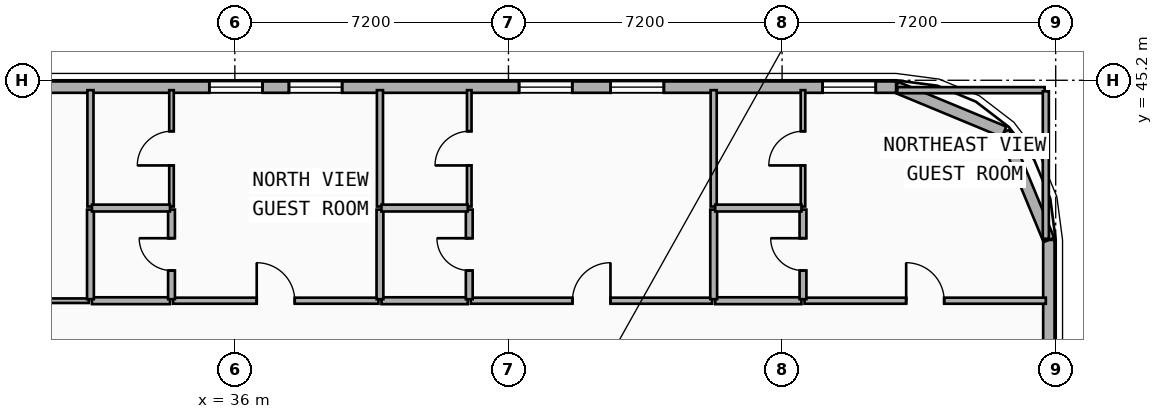
"""IFC4 building model, lengths in metres.
Left out: names, types, materials, properties, quantities, classifications, styles, units other than length and angle.
Written with IfcOpenShell. Run it as: python <this file> out.ifc"""

import sys

from ifc_helpers import new_model, si_unit, direction, frame, frame_2d, origin, place, context, subcontext, project, spatial, rectangle, extrude, element, fill, save


model = new_model("IFC4")
c1 = context("Model", 3, precision=1e-05, world=origin(), true_north=direction((0.0, 1.0)))
c2 = subcontext(c1, "Body", "Model", "MODEL_VIEW")
j1 = project(units=[si_unit("LENGTHUNIT", "METRE"), si_unit("PLANEANGLEUNIT", "RADIAN")], contexts=[c1])
p1 = place(None, origin())
s1 = spatial("IfcSite", under=j1, at=p1, CompositionType="ELEMENT")
p2 = place(p1, origin())
s2 = spatial("IfcBuilding", under=s1, at=p2, CompositionType="ELEMENT")
p3 = place(p2, frame((0.0, 0.0, 29.0)))
s3 = spatial("IfcBuildingStorey", under=s2, at=p3, CompositionType="ELEMENT", Elevation=29.0)
p4 = place(p3, frame((57.42, 41.0, 0.0), z_axis=(0.0, 0.0, 1.0), x_axis=(0.0, -1.0, 0.0)))
e1 = element("IfcWall", 1, at=p4, inside=s3, PredefinedType="SOLIDWALL", context=c2, shape_type="SweptSolid", body=[
    extrude(rectangle(XDim=15.2, YDim=0.3, at=frame_2d((7.6, 0.0))), origin(), (0.0, 0.0, 1.0), 3.24),
])
p5 = place(p4, frame((10.882, 0.0, 0.48)))
e2 = element("IfcOpeningElement", 2, at=p5, cuts=e1, PredefinedType="OPENING", context=c2, shape_type="SweptSolid", body=[
    extrude(rectangle(XDim=1.4, YDim=1.8, at=frame_2d((0.7, 0.9))), frame((0.0, 0.16, 0.0), z_axis=(0.0, -1.0, 0.0), x_axis=(1.0, 0.0, 0.0)), (0.0, 0.0, 1.0), 0.32),
])
p6 = place(p4, frame((5.621, 0.0, 0.48)))
e3 = element("IfcOpeningElement", 3, at=p6, cuts=e1, PredefinedType="OPENING", context=c2, shape_type="SweptSolid", body=[
    extrude(rectangle(XDim=1.4, YDim=1.8, at=frame_2d((0.7, 0.9))), frame((0.0, 0.16, 0.0), z_axis=(0.0, -1.0, 0.0), x_axis=(1.0, 0.0, 0.0)), (0.0, 0.0, 1.0), 0.32),
])
p7 = place(p3, frame((56.243, 43.843, 0.0), z_axis=(0.0, 0.0, 1.0), x_axis=(0.382636798336, -0.92389884758, 0.0)))
e4 = element("IfcWall", 4, at=p7, inside=s3, PredefinedType="SOLIDWALL", context=c2, shape_type="SweptSolid", body=[
    extrude(rectangle(XDim=3.077, YDim=0.3, at=frame_2d((1.538, 0.0))), origin(), (0.0, 0.0, 1.0), 3.24),
])
p8 = place(p3, frame((53.4, 45.02, 0.0), z_axis=(0.0, 0.0, 1.0), x_axis=(0.923882414032, -0.382676475685, 0.0)))
e5 = element("IfcWall", 5, at=p8, inside=s3, PredefinedType="SOLIDWALL", context=c2, shape_type="SweptSolid", body=[
    extrude(rectangle(XDim=3.077, YDim=0.3, at=frame_2d((1.539, 0.0))), origin(), (0.0, 0.0, 1.0), 3.24),
])
p9 = place(p3, frame((4.2, 45.02, 0.0), z_axis=(0.0, 0.0, 1.0), x_axis=(1.0, 0.0, 0.0)))
e6 = element("IfcWall", 6, at=p9, inside=s3, PredefinedType="SOLIDWALL", context=c2, shape_type="SweptSolid", body=[
    extrude(rectangle(XDim=49.2, YDim=0.3, at=frame_2d((24.6, 0.0))), origin(), (0.0, 0.0, 1.0), 3.24),
])
p10 = place(p9, frame((10.407, 0.0, 0.85)))
e7 = element("IfcOpeningElement", 7, at=p10, cuts=e6, PredefinedType="OPENING", context=c2, shape_type="SweptSolid", body=[
    extrude(rectangle(XDim=1.4, YDim=1.8, at=frame_2d((0.7, 0.9))), frame((0.0, 0.16, 0.0), z_axis=(0.0, -1.0, 0.0), x_axis=(1.0, 0.0, 0.0)), (0.0, 0.0, 1.0), 0.32),
])
p11 = place(p9, frame((19.053, 0.0, 0.85)))
e8 = element("IfcOpeningElement", 8, at=p11, cuts=e6, PredefinedType="OPENING", context=c2, shape_type="SweptSolid", body=[
    extrude(rectangle(XDim=1.4, YDim=1.8, at=frame_2d((0.7, 0.9))), frame((0.0, 0.16, 0.0), z_axis=(0.0, -1.0, 0.0), x_axis=(1.0, 0.0, 0.0)), (0.0, 0.0, 1.0), 0.32),
])
p12 = place(p9, frame((31.128, 0.0, 0.85)))
e9 = element("IfcOpeningElement", 9, at=p12, cuts=e6, PredefinedType="OPENING", context=c2, shape_type="SweptSolid", body=[
    extrude(rectangle(XDim=1.4, YDim=1.8, at=frame_2d((0.7, 0.9))), frame((0.0, 0.16, 0.0), z_axis=(0.0, -1.0, 0.0), x_axis=(1.0, 0.0, 0.0)), (0.0, 0.0, 1.0), 0.32),
])
p13 = place(p9, frame((33.223, 0.0, 0.85)))
e10 = element("IfcOpeningElement", 10, at=p13, cuts=e6, PredefinedType="OPENING", context=c2, shape_type="SweptSolid", body=[
    extrude(rectangle(XDim=1.4, YDim=1.8, at=frame_2d((0.7, 0.9))), frame((0.0, 0.16, 0.0), z_axis=(0.0, -1.0, 0.0), x_axis=(1.0, 0.0, 0.0)), (0.0, 0.0, 1.0), 0.32),
])
p14 = place(p9, frame((39.279, 0.0, 0.85)))
e11 = element("IfcOpeningElement", 11, at=p14, cuts=e6, PredefinedType="OPENING", context=c2, shape_type="SweptSolid", body=[
    extrude(rectangle(XDim=1.4, YDim=1.8, at=frame_2d((0.7, 0.9))), frame((0.0, 0.16, 0.0), z_axis=(0.0, -1.0, 0.0), x_axis=(1.0, 0.0, 0.0)), (0.0, 0.0, 1.0), 0.32),
])
p15 = place(p9, frame((41.689, 0.0, 0.85)))
e12 = element("IfcOpeningElement", 12, at=p15, cuts=e6, PredefinedType="OPENING", context=c2, shape_type="SweptSolid", body=[
    extrude(rectangle(XDim=1.4, YDim=1.8, at=frame_2d((0.7, 0.9))), frame((0.0, 0.16, 0.0), z_axis=(0.0, -1.0, 0.0), x_axis=(1.0, 0.0, 0.0)), (0.0, 0.0, 1.0), 0.32),
])
p16 = place(p9, frame((47.265, 0.0, 0.85)))
e13 = element("IfcOpeningElement", 13, at=p16, cuts=e6, PredefinedType="OPENING", context=c2, shape_type="SweptSolid", body=[
    extrude(rectangle(XDim=1.4, YDim=1.8, at=frame_2d((0.7, 0.9))), frame((0.0, 0.16, 0.0), z_axis=(0.0, -1.0, 0.0), x_axis=(1.0, 0.0, 0.0)), (0.0, 0.0, 1.0), 0.32),
])
p17 = place(p3, frame((7.1, 39.4, 0.0), z_axis=(0.0, 0.0, 1.0), x_axis=(1.0, 0.0, 0.0)))
e14 = element("IfcWall", 14, at=p17, inside=s3, PredefinedType="PARTITIONING", context=c2, shape_type="SweptSolid", body=[
    extrude(rectangle(XDim=25.06, YDim=0.12, at=frame_2d((12.53, 0.0))), origin(), (0.0, 0.0, 1.0), 3.24),
])
p18 = place(p17, frame((12.08, 0.0, 0.0)))
e15 = element("IfcOpeningElement", 15, at=p18, cuts=e14, PredefinedType="OPENING", context=c2, shape_type="SweptSolid", body=[
    extrude(rectangle(XDim=0.9, YDim=2.1, at=frame_2d((0.45, 1.05))), frame((0.0, 0.07, 0.0), z_axis=(0.0, -1.0, 0.0), x_axis=(1.0, 0.0, 0.0)), (0.0, 0.0, 1.0), 0.14),
])
p19 = place(p3, frame((34.373, 39.4, 0.0), z_axis=(0.0, 0.0, 1.0), x_axis=(1.0, 0.0, 0.0)))
e16 = element("IfcWall", 16, at=p19, inside=s3, PredefinedType="PARTITIONING", context=c2, shape_type="SweptSolid", body=[
    extrude(rectangle(XDim=5.405, YDim=0.16, at=frame_2d((2.703, 0.0))), origin(), (0.0, 0.0, 1.0), 3.24),
])
p20 = place(p19, frame((2.202, 0.0, 0.0)))
e17 = element("IfcOpeningElement", 17, at=p20, cuts=e16, PredefinedType="OPENING", context=c2, shape_type="SweptSolid", body=[
    extrude(rectangle(XDim=1.0, YDim=2.15, at=frame_2d((0.5, 1.075))), frame((0.0, 0.09, 0.0), z_axis=(0.0, -1.0, 0.0), x_axis=(1.0, 0.0, 0.0)), (0.0, 0.0, 1.0), 0.18),
])
p21 = place(p3, frame((32.24, 39.4, 0.0), z_axis=(0.0, 0.0, 1.0), x_axis=(1.0, 0.0, 0.0)))
e18 = element("IfcWall", 18, at=p21, inside=s3, PredefinedType="PLUMBINGWALL", context=c2, shape_type="SweptSolid", body=[
    extrude(rectangle(XDim=2.053, YDim=0.18, at=frame_2d((1.026, 0.0))), origin(), (0.0, 0.0, 1.0), 3.24),
])
p22 = place(p3, frame((42.208, 39.4, 0.0), z_axis=(0.0, 0.0, 1.0), x_axis=(1.0, 0.0, 0.0)))
e19 = element("IfcWall", 19, at=p22, inside=s3, PredefinedType="PARTITIONING", context=c2, shape_type="SweptSolid", body=[
    extrude(rectangle(XDim=6.352, YDim=0.16, at=frame_2d((3.176, 0.0))), origin(), (0.0, 0.0, 1.0), 3.24),
])
p23 = place(p22, frame((2.676, 0.0, 0.0)))
e20 = element("IfcOpeningElement", 20, at=p23, cuts=e19, PredefinedType="OPENING", context=c2, shape_type="SweptSolid", body=[
    extrude(rectangle(XDim=1.0, YDim=2.15, at=frame_2d((0.5, 1.075))), frame((0.0, 0.09, 0.0), z_axis=(0.0, -1.0, 0.0), x_axis=(1.0, 0.0, 0.0)), (0.0, 0.0, 1.0), 0.18),
])
p24 = place(p3, frame((39.858, 39.4, 0.0), z_axis=(0.0, 0.0, 1.0), x_axis=(1.0, 0.0, 0.0)))
e21 = element("IfcWall", 21, at=p24, inside=s3, PredefinedType="PLUMBINGWALL", context=c2, shape_type="SweptSolid", body=[
    extrude(rectangle(XDim=2.27, YDim=0.18, at=frame_2d((1.135, 0.0))), origin(), (0.0, 0.0, 1.0), 3.24),
])
p25 = place(p3, frame((50.99, 39.4, 0.0), z_axis=(0.0, 0.0, 1.0), x_axis=(1.0, 0.0, 0.0)))
e22 = element("IfcWall", 22, at=p25, inside=s3, PredefinedType="PARTITIONING", context=c2, shape_type="SweptSolid", body=[
    extrude(rectangle(XDim=6.35, YDim=0.16, at=frame_2d((3.175, 0.0))), origin(), (0.0, 0.0, 1.0), 3.24),
])
p26 = place(p25, frame((2.675, 0.0, 0.0)))
e23 = element("IfcOpeningElement", 23, at=p26, cuts=e22, PredefinedType="OPENING", context=c2, shape_type="SweptSolid", body=[
    extrude(rectangle(XDim=1.0, YDim=2.15, at=frame_2d((0.5, 1.075))), frame((0.0, 0.09, 0.0), z_axis=(0.0, -1.0, 0.0), x_axis=(1.0, 0.0, 0.0)), (0.0, 0.0, 1.0), 0.18),
])
p27 = place(p3, frame((48.64, 39.4, 0.0), z_axis=(0.0, 0.0, 1.0), x_axis=(1.0, 0.0, 0.0)))
e24 = element("IfcWall", 24, at=p27, inside=s3, PredefinedType="PLUMBINGWALL", context=c2, shape_type="SweptSolid", body=[
    extrude(rectangle(XDim=2.27, YDim=0.18, at=frame_2d((1.135, 0.0))), origin(), (0.0, 0.0, 1.0), 3.24),
])
p28 = place(p3, frame((32.2, 39.44, 0.0), z_axis=(0.0, 0.0, 1.0), x_axis=(0.0, 1.0, 0.0)))
e25 = element("IfcWall", 25, at=p28, inside=s3, PredefinedType="PLUMBINGWALL", context=c2, shape_type="SweptSolid", body=[
    extrude(rectangle(XDim=2.358, YDim=0.18, at=frame_2d((1.179, 0.0))), origin(), (0.0, 0.0, 1.0), 3.24),
])
p29 = place(p3, frame((32.2, 41.878, 0.0), z_axis=(0.0, 0.0, 1.0), x_axis=(0.0, 1.0, 0.0)))
e26 = element("IfcWall", 26, at=p29, inside=s3, PredefinedType="PARTITIONING", context=c2, shape_type="SweptSolid", body=[
    extrude(rectangle(XDim=3.062, YDim=0.16, at=frame_2d((1.531, 0.0))), origin(), (0.0, 0.0, 1.0), 3.24),
])
p30 = place(p3, frame((34.333, 39.44, 0.0), z_axis=(0.0, 0.0, 1.0), x_axis=(0.0, 1.0, 0.0)))
e27 = element("IfcWall", 27, at=p30, inside=s3, PredefinedType="PLUMBINGWALL", context=c2, shape_type="SweptSolid", body=[
    extrude(rectangle(XDim=2.358, YDim=0.18, at=frame_2d((1.179, 0.0))), origin(), (0.0, 0.0, 1.0), 3.24),
])
p31 = place(p30, frame((0.754, 0.0, 0.0)))
e28 = element("IfcOpeningElement", 28, at=p31, cuts=e27, PredefinedType="OPENING", context=c2, shape_type="SweptSolid", body=[
    extrude(rectangle(XDim=0.85, YDim=2.1, at=frame_2d((0.425, 1.05))), frame((0.0, 0.1, 0.0), z_axis=(0.0, -1.0, 0.0), x_axis=(1.0, 0.0, 0.0)), (0.0, 0.0, 1.0), 0.2),
])
p32 = place(p3, frame((34.333, 41.878, 0.0), z_axis=(0.0, 0.0, 1.0), x_axis=(0.0, 1.0, 0.0)))
e29 = element("IfcWall", 29, at=p32, inside=s3, PredefinedType="PARTITIONING", context=c2, shape_type="SweptSolid", body=[
    extrude(rectangle(XDim=3.062, YDim=0.12, at=frame_2d((1.531, 0.0))), origin(), (0.0, 0.0, 1.0), 3.24),
])
p33 = place(p32, frame((1.081, 0.0, 0.0)))
e30 = element("IfcOpeningElement", 30, at=p33, cuts=e29, PredefinedType="OPENING", context=c2, shape_type="SweptSolid", body=[
    extrude(rectangle(XDim=0.9, YDim=2.1, at=frame_2d((0.45, 1.05))), frame((0.0, 0.07, 0.0), z_axis=(0.0, -1.0, 0.0), x_axis=(1.0, 0.0, 0.0)), (0.0, 0.0, 1.0), 0.14),
])
p34 = place(p3, frame((39.818, 39.44, 0.0), z_axis=(0.0, 0.0, 1.0), x_axis=(0.0, 1.0, 0.0)))
e31 = element("IfcWall", 31, at=p34, inside=s3, PredefinedType="PLUMBINGWALL", context=c2, shape_type="SweptSolid", body=[
    extrude(rectangle(XDim=2.358, YDim=0.18, at=frame_2d((1.179, 0.0))), origin(), (0.0, 0.0, 1.0), 3.24),
])
p35 = place(p3, frame((39.818, 41.878, 0.0), z_axis=(0.0, 0.0, 1.0), x_axis=(0.0, 1.0, 0.0)))
e32 = element("IfcWall", 32, at=p35, inside=s3, PredefinedType="PARTITIONING", context=c2, shape_type="SweptSolid", body=[
    extrude(rectangle(XDim=3.062, YDim=0.16, at=frame_2d((1.531, 0.0))), origin(), (0.0, 0.0, 1.0), 3.24),
])
p36 = place(p3, frame((32.24, 41.838, 0.0), z_axis=(0.0, 0.0, 1.0), x_axis=(1.0, 0.0, 0.0)))
e33 = element("IfcWall", 33, at=p36, inside=s3, PredefinedType="PLUMBINGWALL", context=c2, shape_type="SweptSolid", body=[
    extrude(rectangle(XDim=2.053, YDim=0.18, at=frame_2d((1.026, 0.0))), origin(), (0.0, 0.0, 1.0), 3.24),
])
p37 = place(p3, frame((42.168, 39.44, 0.0), z_axis=(0.0, 0.0, 1.0), x_axis=(0.0, 1.0, 0.0)))
e34 = element("IfcWall", 34, at=p37, inside=s3, PredefinedType="PLUMBINGWALL", context=c2, shape_type="SweptSolid", body=[
    extrude(rectangle(XDim=2.358, YDim=0.18, at=frame_2d((1.179, 0.0))), origin(), (0.0, 0.0, 1.0), 3.24),
])
p38 = place(p37, frame((0.754, 0.0, 0.0)))
e35 = element("IfcOpeningElement", 35, at=p38, cuts=e34, PredefinedType="OPENING", context=c2, shape_type="SweptSolid", body=[
    extrude(rectangle(XDim=0.85, YDim=2.1, at=frame_2d((0.425, 1.05))), frame((0.0, 0.1, 0.0), z_axis=(0.0, -1.0, 0.0), x_axis=(1.0, 0.0, 0.0)), (0.0, 0.0, 1.0), 0.2),
])
p39 = place(p3, frame((42.168, 41.878, 0.0), z_axis=(0.0, 0.0, 1.0), x_axis=(0.0, 1.0, 0.0)))
e36 = element("IfcWall", 36, at=p39, inside=s3, PredefinedType="PARTITIONING", context=c2, shape_type="SweptSolid", body=[
    extrude(rectangle(XDim=3.062, YDim=0.12, at=frame_2d((1.531, 0.0))), origin(), (0.0, 0.0, 1.0), 3.24),
])
p40 = place(p39, frame((1.081, 0.0, 0.0)))
e37 = element("IfcOpeningElement", 37, at=p40, cuts=e36, PredefinedType="OPENING", context=c2, shape_type="SweptSolid", body=[
    extrude(rectangle(XDim=0.9, YDim=2.1, at=frame_2d((0.45, 1.05))), frame((0.0, 0.07, 0.0), z_axis=(0.0, -1.0, 0.0), x_axis=(1.0, 0.0, 0.0)), (0.0, 0.0, 1.0), 0.14),
])
p41 = place(p3, frame((48.6, 39.44, 0.0), z_axis=(0.0, 0.0, 1.0), x_axis=(0.0, 1.0, 0.0)))
e38 = element("IfcWall", 38, at=p41, inside=s3, PredefinedType="PLUMBINGWALL", context=c2, shape_type="SweptSolid", body=[
    extrude(rectangle(XDim=2.358, YDim=0.18, at=frame_2d((1.179, 0.0))), origin(), (0.0, 0.0, 1.0), 3.24),
])
p42 = place(p3, frame((48.6, 41.878, 0.0), z_axis=(0.0, 0.0, 1.0), x_axis=(0.0, 1.0, 0.0)))
e39 = element("IfcWall", 39, at=p42, inside=s3, PredefinedType="PARTITIONING", context=c2, shape_type="SweptSolid", body=[
    extrude(rectangle(XDim=3.062, YDim=0.16, at=frame_2d((1.531, 0.0))), origin(), (0.0, 0.0, 1.0), 3.24),
])
p43 = place(p3, frame((39.858, 41.838, 0.0), z_axis=(0.0, 0.0, 1.0), x_axis=(1.0, 0.0, 0.0)))
e40 = element("IfcWall", 40, at=p43, inside=s3, PredefinedType="PLUMBINGWALL", context=c2, shape_type="SweptSolid", body=[
    extrude(rectangle(XDim=2.27, YDim=0.18, at=frame_2d((1.135, 0.0))), origin(), (0.0, 0.0, 1.0), 3.24),
])
p44 = place(p3, frame((50.95, 39.44, 0.0), z_axis=(0.0, 0.0, 1.0), x_axis=(0.0, 1.0, 0.0)))
e41 = element("IfcWall", 41, at=p44, inside=s3, PredefinedType="PLUMBINGWALL", context=c2, shape_type="SweptSolid", body=[
    extrude(rectangle(XDim=2.358, YDim=0.18, at=frame_2d((1.179, 0.0))), origin(), (0.0, 0.0, 1.0), 3.24),
])
p45 = place(p44, frame((0.754, 0.0, 0.0)))
e42 = element("IfcOpeningElement", 42, at=p45, cuts=e41, PredefinedType="OPENING", context=c2, shape_type="SweptSolid", body=[
    extrude(rectangle(XDim=0.85, YDim=2.1, at=frame_2d((0.425, 1.05))), frame((0.0, 0.1, 0.0), z_axis=(0.0, -1.0, 0.0), x_axis=(1.0, 0.0, 0.0)), (0.0, 0.0, 1.0), 0.2),
])
p46 = place(p3, frame((50.95, 41.878, 0.0), z_axis=(0.0, 0.0, 1.0), x_axis=(0.0, 1.0, 0.0)))
e43 = element("IfcWall", 43, at=p46, inside=s3, PredefinedType="PARTITIONING", context=c2, shape_type="SweptSolid", body=[
    extrude(rectangle(XDim=3.062, YDim=0.12, at=frame_2d((1.531, 0.0))), origin(), (0.0, 0.0, 1.0), 3.24),
])
p47 = place(p46, frame((1.081, 0.0, 0.0)))
e44 = element("IfcOpeningElement", 44, at=p47, cuts=e43, PredefinedType="OPENING", context=c2, shape_type="SweptSolid", body=[
    extrude(rectangle(XDim=0.9, YDim=2.1, at=frame_2d((0.45, 1.05))), frame((0.0, 0.07, 0.0), z_axis=(0.0, -1.0, 0.0), x_axis=(1.0, 0.0, 0.0)), (0.0, 0.0, 1.0), 0.14),
])
p48 = place(p3, frame((48.64, 41.838, 0.0), z_axis=(0.0, 0.0, 1.0), x_axis=(1.0, 0.0, 0.0)))
e45 = element("IfcWall", 45, at=p48, inside=s3, PredefinedType="PLUMBINGWALL", context=c2, shape_type="SweptSolid", body=[
    extrude(rectangle(XDim=2.27, YDim=0.18, at=frame_2d((1.135, 0.0))), origin(), (0.0, 0.0, 1.0), 3.24),
])
p49 = place(p3, frame((53.43, 44.94, 0.0), z_axis=(0.0, 0.0, 1.0), x_axis=(1.0, 0.0, 0.0)))
e46 = element("IfcWall", 46, at=p49, inside=s3, PredefinedType="PARTITIONING", context=c2, shape_type="SweptSolid", body=[
    extrude(rectangle(XDim=3.88, YDim=0.16, at=frame_2d((1.94, 0.0))), origin(), (0.0, 0.0, 1.0), 3.24),
])
p50 = place(p3, frame((57.34, 41.03, 0.0), z_axis=(0.0, 0.0, 1.0), x_axis=(0.0, 1.0, 0.0)))
e47 = element("IfcWall", 47, at=p50, inside=s3, PredefinedType="PARTITIONING", context=c2, shape_type="SweptSolid", body=[
    extrude(rectangle(XDim=3.88, YDim=0.16, at=frame_2d((1.94, 0.0))), origin(), (0.0, 0.0, 1.0), 3.24),
])
p51 = place(p12, origin())
e48 = element("IfcWindow", 48, at=p51, inside=s3, PartitioningType="SINGLE_PANEL", PredefinedType="WINDOW", context=c2, shape_type="SweptSolid", body=[
    extrude(rectangle(XDim=1.4, YDim=1.8, at=frame_2d((0.7, 0.9))), frame((0.0, 0.03, 0.0), z_axis=(0.0, -1.0, 0.0), x_axis=(1.0, 0.0, 0.0)), (0.0, 0.0, 1.0), 0.06),
])
fill(e9, e48)
p52 = place(p13, origin())
e49 = element("IfcWindow", 49, at=p52, inside=s3, PartitioningType="SINGLE_PANEL", PredefinedType="WINDOW", context=c2, shape_type="SweptSolid", body=[
    extrude(rectangle(XDim=1.4, YDim=1.8, at=frame_2d((0.7, 0.9))), frame((0.0, 0.03, 0.0), z_axis=(0.0, -1.0, 0.0), x_axis=(1.0, 0.0, 0.0)), (0.0, 0.0, 1.0), 0.06),
])
fill(e10, e49)
p53 = place(p14, origin())
e50 = element("IfcWindow", 50, at=p53, inside=s3, PartitioningType="SINGLE_PANEL", PredefinedType="WINDOW", context=c2, shape_type="SweptSolid", body=[
    extrude(rectangle(XDim=1.4, YDim=1.8, at=frame_2d((0.7, 0.9))), frame((0.0, 0.03, 0.0), z_axis=(0.0, -1.0, 0.0), x_axis=(1.0, 0.0, 0.0)), (0.0, 0.0, 1.0), 0.06),
])
fill(e11, e50)
p54 = place(p15, origin())
e51 = element("IfcWindow", 51, at=p54, inside=s3, PartitioningType="SINGLE_PANEL", PredefinedType="WINDOW", context=c2, shape_type="SweptSolid", body=[
    extrude(rectangle(XDim=1.4, YDim=1.8, at=frame_2d((0.7, 0.9))), frame((0.0, 0.03, 0.0), z_axis=(0.0, -1.0, 0.0), x_axis=(1.0, 0.0, 0.0)), (0.0, 0.0, 1.0), 0.06),
])
fill(e12, e51)
p55 = place(p16, origin())
e52 = element("IfcWindow", 52, at=p55, inside=s3, PartitioningType="SINGLE_PANEL", PredefinedType="WINDOW", context=c2, shape_type="SweptSolid", body=[
    extrude(rectangle(XDim=1.4, YDim=1.8, at=frame_2d((0.7, 0.9))), frame((0.0, 0.03, 0.0), z_axis=(0.0, -1.0, 0.0), x_axis=(1.0, 0.0, 0.0)), (0.0, 0.0, 1.0), 0.06),
])
fill(e13, e52)
p56 = place(p20, origin())
e53 = element("IfcDoor", 53, at=p56, inside=s3, OperationType="SINGLE_SWING_LEFT", PredefinedType="DOOR", context=c2, shape_type="SweptSolid", body=[
    extrude(rectangle(XDim=1.0, YDim=2.15, at=frame_2d((0.5, 1.075))), frame((0.0, 0.025, 0.0), z_axis=(0.0, -1.0, 0.0), x_axis=(1.0, 0.0, 0.0)), (0.0, 0.0, 1.0), 0.05),
])
fill(e17, e53)
p57 = place(p23, origin())
e54 = element("IfcDoor", 54, at=p57, inside=s3, OperationType="SINGLE_SWING_RIGHT", PredefinedType="DOOR", context=c2, shape_type="SweptSolid", body=[
    extrude(rectangle(XDim=1.0, YDim=2.15, at=frame_2d((0.5, 1.075))), frame((0.0, 0.025, 0.0), z_axis=(0.0, -1.0, 0.0), x_axis=(1.0, 0.0, 0.0)), (0.0, 0.0, 1.0), 0.05),
])
fill(e20, e54)
p58 = place(p26, origin())
e55 = element("IfcDoor", 55, at=p58, inside=s3, OperationType="SINGLE_SWING_LEFT", PredefinedType="DOOR", context=c2, shape_type="SweptSolid", body=[
    extrude(rectangle(XDim=1.0, YDim=2.15, at=frame_2d((0.5, 1.075))), frame((0.0, 0.025, 0.0), z_axis=(0.0, -1.0, 0.0), x_axis=(1.0, 0.0, 0.0)), (0.0, 0.0, 1.0), 0.05),
])
fill(e23, e55)
p59 = place(p31, origin())
e56 = element("IfcDoor", 56, at=p59, inside=s3, OperationType="SINGLE_SWING_RIGHT", PredefinedType="DOOR", context=c2, shape_type="SweptSolid", body=[
    extrude(rectangle(XDim=0.85, YDim=2.1, at=frame_2d((0.425, 1.05))), frame((0.0, 0.025, 0.0), z_axis=(0.0, -1.0, 0.0), x_axis=(1.0, 0.0, 0.0)), (0.0, 0.0, 1.0), 0.05),
])
fill(e28, e56)
p60 = place(p33, origin())
e57 = element("IfcDoor", 57, at=p60, inside=s3, OperationType="SINGLE_SWING_LEFT", PredefinedType="DOOR", context=c2, shape_type="SweptSolid", body=[
    extrude(rectangle(XDim=0.9, YDim=2.1, at=frame_2d((0.45, 1.05))), frame((0.0, 0.025, 0.0), z_axis=(0.0, -1.0, 0.0), x_axis=(1.0, 0.0, 0.0)), (0.0, 0.0, 1.0), 0.05),
])
fill(e30, e57)
p61 = place(p38, origin())
e58 = element("IfcDoor", 58, at=p61, inside=s3, OperationType="SINGLE_SWING_RIGHT", PredefinedType="DOOR", context=c2, shape_type="SweptSolid", body=[
    extrude(rectangle(XDim=0.85, YDim=2.1, at=frame_2d((0.425, 1.05))), frame((0.0, 0.025, 0.0), z_axis=(0.0, -1.0, 0.0), x_axis=(1.0, 0.0, 0.0)), (0.0, 0.0, 1.0), 0.05),
])
fill(e35, e58)
p62 = place(p40, origin())
e59 = element("IfcDoor", 59, at=p62, inside=s3, OperationType="SINGLE_SWING_LEFT", PredefinedType="DOOR", context=c2, shape_type="SweptSolid", body=[
    extrude(rectangle(XDim=0.9, YDim=2.1, at=frame_2d((0.45, 1.05))), frame((0.0, 0.025, 0.0), z_axis=(0.0, -1.0, 0.0), x_axis=(1.0, 0.0, 0.0)), (0.0, 0.0, 1.0), 0.05),
])
fill(e37, e59)
p63 = place(p45, origin())
e60 = element("IfcDoor", 60, at=p63, inside=s3, OperationType="SINGLE_SWING_RIGHT", PredefinedType="DOOR", context=c2, shape_type="SweptSolid", body=[
    extrude(rectangle(XDim=0.85, YDim=2.1, at=frame_2d((0.425, 1.05))), frame((0.0, 0.025, 0.0), z_axis=(0.0, -1.0, 0.0), x_axis=(1.0, 0.0, 0.0)), (0.0, 0.0, 1.0), 0.05),
])
fill(e42, e60)
p64 = place(p47, origin())
e61 = element("IfcDoor", 61, at=p64, inside=s3, OperationType="SINGLE_SWING_LEFT", PredefinedType="DOOR", context=c2, shape_type="SweptSolid", body=[
    extrude(rectangle(XDim=0.9, YDim=2.1, at=frame_2d((0.45, 1.05))), frame((0.0, 0.025, 0.0), z_axis=(0.0, -1.0, 0.0), x_axis=(1.0, 0.0, 0.0)), (0.0, 0.0, 1.0), 0.05),
])
fill(e44, e61)
save(model, sys.argv[1])
